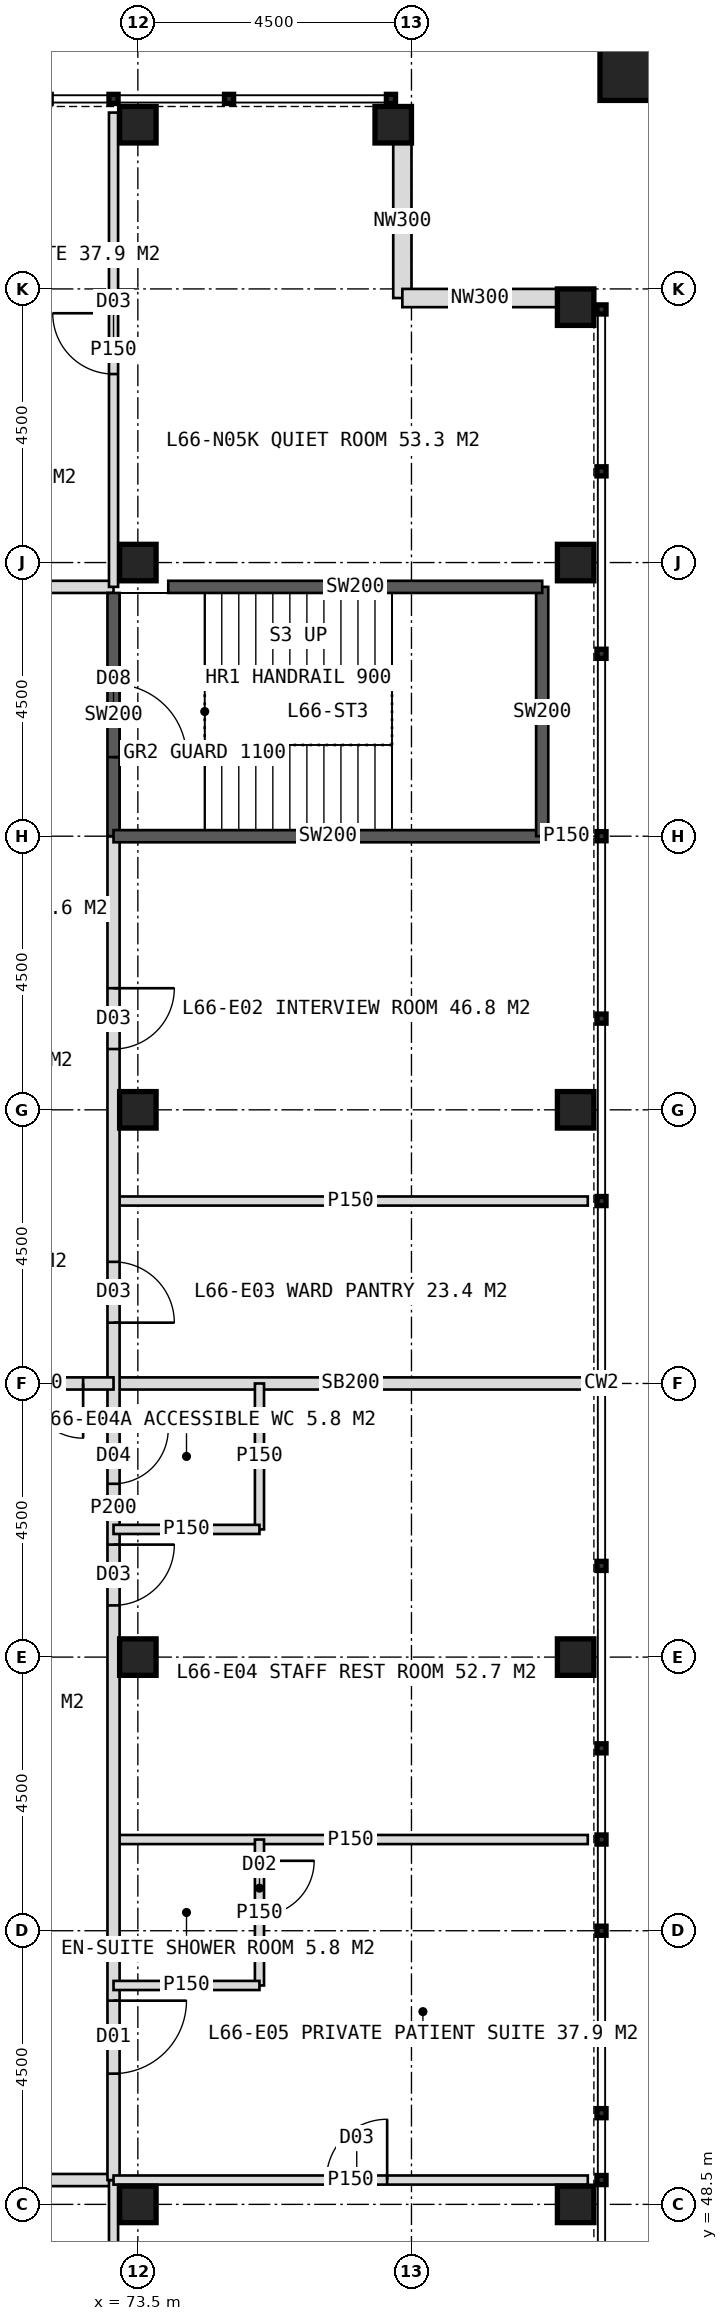
"""IFC4 building model, lengths in metres.
Left out: names, types, materials, properties, quantities, classifications, styles, units other than length and angle.
Written with IfcOpenShell. Run it as: python <this file> out.ifc"""

import sys

from ifc_helpers import new_model, si_unit, direction, frame, frame_2d, origin, origin_2d, place, context, subcontext, project, spatial, rectangle, hollow_rectangle, extrude, element, fill, save


model = new_model("IFC4")
c1 = context("Model", 3, precision=1e-05, world=origin(), true_north=direction((0.0, 1.0)))
c2 = subcontext(c1, "Body", "Model", "MODEL_VIEW")
j1 = project(units=[si_unit("LENGTHUNIT", "METRE"), si_unit("PLANEANGLEUNIT", "RADIAN")], contexts=[c1])
p1 = place(None, origin())
s1 = spatial("IfcSite", under=j1, at=p1, CompositionType="ELEMENT")
p2 = place(p1, origin())
s2 = spatial("IfcBuilding", under=s1, at=p2, CompositionType="ELEMENT")
p3 = place(p2, frame((0.0, 0.0, 274.0)))
s3 = spatial("IfcBuildingStorey", under=s2, at=p3, CompositionType="ELEMENT", Elevation=274.0)
for number, where, z_axis, x_axis in (
    (1, (73.5, 48.5, 0.0), (0.0, 0.0, 1.0), (1.0, 0.0, 0.0)),
    (2, (73.5, 75.5, 0.0), (0.0, 0.0, 1.0), (1.0, 0.0, 0.0)),
    (3, (73.5, 57.5, 0.0), (0.0, 0.0, 1.0), (1.0, 0.0, 0.0)),
    (4, (73.5, 66.5, 0.0), (0.0, 0.0, 1.0), (1.0, 0.0, 0.0)),
    (5, (80.7, 48.5, 0.0), (0.0, 0.0, 1.0), (1.0, 0.0, 0.0)),
    (6, (80.7, 57.5, 0.0), (0.0, 0.0, 1.0), (1.0, 0.0, 0.0)),
    (7, (80.7, 66.5, 0.0), (0.0, 0.0, 1.0), (1.0, 0.0, 0.0)),
    (8, (73.5, 82.7, 0.0), (0.0, 0.0, 1.0), (1.0, 0.0, 0.0)),
    (9, (80.7, 75.5, 0.0), (0.0, 0.0, 1.0), (1.0, 0.0, 0.0)),
    (10, (77.7, 82.7, 0.0), (0.0, 0.0, 1.0), (1.0, 0.0, 0.0)),
    (11, (80.7, 79.7, 0.0), (0.0, 0.0, 1.0), (1.0, 0.0, 0.0)),
):
    element("IfcColumn", number, at=place(p3, frame(where, z_axis=z_axis, x_axis=x_axis)), inside=s3, PredefinedType="COLUMN", context=c2, shape_type="SweptSolid", body=[
        extrude(hollow_rectangle(XDim=0.6, YDim=0.6, WallThickness=0.04, at=origin_2d()), origin(), (0.0, 0.0, 1.0), 4.0),
    ])
p4 = place(p3, frame((81.6, 83.6, 0.0), z_axis=(0.0, 0.0, 1.0), x_axis=(1.0, 0.0, 0.0)))
e12 = element("IfcColumn", 12, at=p4, inside=s3, PredefinedType="COLUMN", context=c2, shape_type="SweptSolid", body=[
    extrude(hollow_rectangle(XDim=1.0, YDim=1.0, WallThickness=0.06, at=origin_2d()), origin(), (0.0, 0.0, 1.0), 4.0),
])
for number, where, z_axis, x_axis in (
    (13, (77.85, 82.4, 0.0), (0.0, 0.0, 1.0), (0.0, -1.0, 0.0)),
    (14, (77.85, 79.85, 0.0), (0.0, 0.0, 1.0), (1.0, 0.0, 0.0)),
):
    element("IfcWall", number, at=place(p3, frame(where, z_axis=z_axis, x_axis=x_axis)), inside=s3, PredefinedType="ELEMENTEDWALL", context=c2, shape_type="SweptSolid", body=[
        extrude(rectangle(XDim=2.55, YDim=0.3, at=frame_2d((1.275, 0.0))), origin(), (0.0, 0.0, 1.0), 2.95),
    ])
p5 = place(p3, frame((46.9, 75.1, 0.0), z_axis=(0.0, 0.0, 1.0), x_axis=(1.0, 0.0, 0.0)))
e15 = element("IfcWall", 15, at=p5, inside=s3, PredefinedType="PARTITIONING", context=c2, shape_type="SweptSolid", body=[
    extrude(rectangle(XDim=26.2, YDim=0.2, at=frame_2d((13.1, 0.0))), origin(), (0.0, 0.0, 1.0), 3.75),
])
p6 = place(p5, frame((1.75, 0.0, 0.0)))
e16 = element("IfcOpeningElement", 16, at=p6, cuts=e15, PredefinedType="OPENING", context=c2, shape_type="SweptSolid", body=[
    extrude(rectangle(XDim=1.2, YDim=2.2, at=frame_2d((0.6, 1.1))), frame((0.0, 0.11, 0.0), z_axis=(0.0, -1.0, 0.0), x_axis=(1.0, 0.0, 0.0)), (0.0, 0.0, 1.0), 0.22),
])
p7 = place(p5, frame((6.75, 0.0, 0.0)))
e17 = element("IfcOpeningElement", 17, at=p7, cuts=e15, PredefinedType="OPENING", context=c2, shape_type="SweptSolid", body=[
    extrude(rectangle(XDim=1.0, YDim=2.1, at=frame_2d((0.5, 1.05))), frame((0.0, 0.11, 0.0), z_axis=(0.0, -1.0, 0.0), x_axis=(1.0, 0.0, 0.0)), (0.0, 0.0, 1.0), 0.22),
])
p8 = place(p5, frame((12.75, 0.0, 0.0)))
e18 = element("IfcOpeningElement", 18, at=p8, cuts=e15, PredefinedType="OPENING", context=c2, shape_type="SweptSolid", body=[
    extrude(rectangle(XDim=1.2, YDim=2.2, at=frame_2d((0.6, 1.1))), frame((0.0, 0.11, 0.0), z_axis=(0.0, -1.0, 0.0), x_axis=(1.0, 0.0, 0.0)), (0.0, 0.0, 1.0), 0.22),
])
p9 = place(p5, frame((18.45, 0.0, 0.0)))
e19 = element("IfcOpeningElement", 19, at=p9, cuts=e15, PredefinedType="OPENING", context=c2, shape_type="SweptSolid", body=[
    extrude(rectangle(XDim=1.0, YDim=2.1, at=frame_2d((0.5, 1.05))), frame((0.0, 0.11, 0.0), z_axis=(0.0, -1.0, 0.0), x_axis=(1.0, 0.0, 0.0)), (0.0, 0.0, 1.0), 0.22),
])
p10 = place(p5, frame((23.25, 0.0, 0.0)))
e20 = element("IfcOpeningElement", 20, at=p10, cuts=e15, PredefinedType="OPENING", context=c2, shape_type="SweptSolid", body=[
    extrude(rectangle(XDim=1.2, YDim=2.2, at=frame_2d((0.6, 1.1))), frame((0.0, 0.11, 0.0), z_axis=(0.0, -1.0, 0.0), x_axis=(1.0, 0.0, 0.0)), (0.0, 0.0, 1.0), 0.22),
])
p11 = place(p3, frame((73.1, 75.1, 0.0), z_axis=(0.0, 0.0, 1.0), x_axis=(0.0, 1.0, 0.0)))
e21 = element("IfcWall", 21, at=p11, inside=s3, PredefinedType="PARTITIONING", context=c2, shape_type="SweptSolid", body=[
    extrude(rectangle(XDim=7.8, YDim=0.15, at=frame_2d((3.9, 0.0))), origin(), (0.0, 0.0, 1.0), 3.75),
])
p12 = place(p11, frame((3.5, 0.0, 0.0)))
e22 = element("IfcOpeningElement", 22, at=p12, cuts=e21, PredefinedType="OPENING", context=c2, shape_type="SweptSolid", body=[
    extrude(rectangle(XDim=1.0, YDim=2.1, at=frame_2d((0.5, 1.05))), frame((0.0, 0.085, 0.0), z_axis=(0.0, -1.0, 0.0), x_axis=(1.0, 0.0, 0.0)), (0.0, 0.0, 1.0), 0.17),
])
p13 = place(p3, frame((73.1, 48.9, 0.0), z_axis=(0.0, 0.0, 1.0), x_axis=(-1.0, 0.0, 0.0)))
e23 = element("IfcWall", 23, at=p13, inside=s3, PredefinedType="PARTITIONING", context=c2, shape_type="SweptSolid", body=[
    extrude(rectangle(XDim=26.2, YDim=0.2, at=frame_2d((13.1, 0.0))), origin(), (0.0, 0.0, 1.0), 3.75),
])
p14 = place(p13, frame((1.55, 0.0, 0.0)))
e24 = element("IfcOpeningElement", 24, at=p14, cuts=e23, PredefinedType="OPENING", context=c2, shape_type="SweptSolid", body=[
    extrude(rectangle(XDim=1.0, YDim=2.1, at=frame_2d((0.5, 1.05))), frame((0.0, 0.11, 0.0), z_axis=(0.0, -1.0, 0.0), x_axis=(1.0, 0.0, 0.0)), (0.0, 0.0, 1.0), 0.22),
])
p15 = place(p13, frame((6.75, 0.0, 0.0)))
e25 = element("IfcOpeningElement", 25, at=p15, cuts=e23, PredefinedType="OPENING", context=c2, shape_type="SweptSolid", body=[
    extrude(rectangle(XDim=1.0, YDim=2.1, at=frame_2d((0.5, 1.05))), frame((0.0, 0.11, 0.0), z_axis=(0.0, -1.0, 0.0), x_axis=(1.0, 0.0, 0.0)), (0.0, 0.0, 1.0), 0.22),
])
p16 = place(p13, frame((14.25, 0.0, 0.0)))
e26 = element("IfcOpeningElement", 26, at=p16, cuts=e23, PredefinedType="OPENING", context=c2, shape_type="SweptSolid", body=[
    extrude(rectangle(XDim=1.2, YDim=2.2, at=frame_2d((0.6, 1.1))), frame((0.0, 0.11, 0.0), z_axis=(0.0, -1.0, 0.0), x_axis=(1.0, 0.0, 0.0)), (0.0, 0.0, 1.0), 0.22),
])
p17 = place(p13, frame((18.45, 0.0, 0.0)))
e27 = element("IfcOpeningElement", 27, at=p17, cuts=e23, PredefinedType="OPENING", context=c2, shape_type="SweptSolid", body=[
    extrude(rectangle(XDim=1.0, YDim=2.1, at=frame_2d((0.5, 1.05))), frame((0.0, 0.11, 0.0), z_axis=(0.0, -1.0, 0.0), x_axis=(1.0, 0.0, 0.0)), (0.0, 0.0, 1.0), 0.22),
])
p18 = place(p13, frame((23.25, 0.0, 0.0)))
e28 = element("IfcOpeningElement", 28, at=p18, cuts=e23, PredefinedType="OPENING", context=c2, shape_type="SweptSolid", body=[
    extrude(rectangle(XDim=1.2, YDim=2.2, at=frame_2d((0.6, 1.1))), frame((0.0, 0.11, 0.0), z_axis=(0.0, -1.0, 0.0), x_axis=(1.0, 0.0, 0.0)), (0.0, 0.0, 1.0), 0.22),
])
p19 = place(p3, frame((73.1, 48.9, 0.0), z_axis=(0.0, 0.0, 1.0), x_axis=(0.0, -1.0, 0.0)))
e29 = element("IfcWall", 29, at=p19, inside=s3, PredefinedType="PARTITIONING", context=c2, shape_type="SweptSolid", body=[
    extrude(rectangle(XDim=7.8, YDim=0.15, at=frame_2d((3.9, 0.0))), origin(), (0.0, 0.0, 1.0), 3.75),
])
p20 = place(p3, frame((80.2, 71.0, 0.0), z_axis=(0.0, 0.0, 1.0), x_axis=(1.0, 0.0, 0.0)))
e30 = element("IfcWall", 30, at=p20, inside=s3, PredefinedType="PARTITIONING", context=c2, shape_type="SweptSolid", body=[
    extrude(rectangle(XDim=0.7, YDim=0.15, at=frame_2d((0.35, 0.0))), origin(), (0.0, 0.0, 1.0), 3.75),
])
p21 = place(p3, frame((73.1, 65.0, 0.0), z_axis=(0.0, 0.0, 1.0), x_axis=(1.0, 0.0, 0.0)))
e31 = element("IfcWall", 31, at=p21, inside=s3, PredefinedType="PARTITIONING", context=c2, shape_type="SweptSolid", body=[
    extrude(rectangle(XDim=7.8, YDim=0.15, at=frame_2d((3.9, 0.0))), origin(), (0.0, 0.0, 1.0), 3.75),
])
p22 = place(p3, frame((73.1, 62.0, 0.0), z_axis=(0.0, 0.0, 1.0), x_axis=(1.0, 0.0, 0.0)))
e32 = element("IfcWall", 32, at=p22, inside=s3, PredefinedType="SOLIDWALL", context=c2, shape_type="SweptSolid", body=[
    extrude(rectangle(XDim=7.8, YDim=0.2, at=frame_2d((3.9, 0.0))), origin(), (0.0, 0.0, 1.0), 2.75),
])
p23 = place(p3, frame((73.1, 54.5, 0.0), z_axis=(0.0, 0.0, 1.0), x_axis=(1.0, 0.0, 0.0)))
e33 = element("IfcWall", 33, at=p23, inside=s3, PredefinedType="PARTITIONING", context=c2, shape_type="SweptSolid", body=[
    extrude(rectangle(XDim=7.8, YDim=0.15, at=frame_2d((3.9, 0.0))), origin(), (0.0, 0.0, 1.0), 3.75),
])
p24 = place(p3, frame((73.1, 71.0, 0.0), z_axis=(0.0, 0.0, 1.0), x_axis=(0.0, -1.0, 0.0)))
e34 = element("IfcWall", 34, at=p24, inside=s3, PredefinedType="PARTITIONING", context=c2, shape_type="SweptSolid", body=[
    extrude(rectangle(XDim=22.1, YDim=0.2, at=frame_2d((11.05, 0.0))), origin(), (0.0, 0.0, 1.0), 3.75),
])
p25 = place(p24, frame((2.5, 0.0, 0.0)))
e35 = element("IfcOpeningElement", 35, at=p25, cuts=e34, PredefinedType="OPENING", context=c2, shape_type="SweptSolid", body=[
    extrude(rectangle(XDim=1.0, YDim=2.1, at=frame_2d((0.5, 1.05))), frame((0.0, 0.11, 0.0), z_axis=(0.0, -1.0, 0.0), x_axis=(1.0, 0.0, 0.0)), (0.0, 0.0, 1.0), 0.22),
])
p26 = place(p24, frame((7.0, 0.0, 0.0)))
e36 = element("IfcOpeningElement", 36, at=p26, cuts=e34, PredefinedType="OPENING", context=c2, shape_type="SweptSolid", body=[
    extrude(rectangle(XDim=1.0, YDim=2.1, at=frame_2d((0.5, 1.05))), frame((0.0, 0.11, 0.0), z_axis=(0.0, -1.0, 0.0), x_axis=(1.0, 0.0, 0.0)), (0.0, 0.0, 1.0), 0.22),
])
p27 = place(p24, frame((9.75, 0.0, 0.0)))
e37 = element("IfcOpeningElement", 37, at=p27, cuts=e34, PredefinedType="OPENING", context=c2, shape_type="SweptSolid", body=[
    extrude(rectangle(XDim=0.9, YDim=2.1, at=frame_2d((0.45, 1.05))), frame((0.0, 0.11, 0.0), z_axis=(0.0, -1.0, 0.0), x_axis=(1.0, 0.0, 0.0)), (0.0, 0.0, 1.0), 0.22),
])
p28 = place(p24, frame((11.65, 0.0, 0.0)))
e38 = element("IfcOpeningElement", 38, at=p28, cuts=e34, PredefinedType="OPENING", context=c2, shape_type="SweptSolid", body=[
    extrude(rectangle(XDim=1.0, YDim=2.1, at=frame_2d((0.5, 1.05))), frame((0.0, 0.11, 0.0), z_axis=(0.0, -1.0, 0.0), x_axis=(1.0, 0.0, 0.0)), (0.0, 0.0, 1.0), 0.22),
])
p29 = place(p24, frame((19.15, 0.0, 0.0)))
e39 = element("IfcOpeningElement", 39, at=p29, cuts=e34, PredefinedType="OPENING", context=c2, shape_type="SweptSolid", body=[
    extrude(rectangle(XDim=1.2, YDim=2.2, at=frame_2d((0.6, 1.1))), frame((0.0, 0.11, 0.0), z_axis=(0.0, -1.0, 0.0), x_axis=(1.0, 0.0, 0.0)), (0.0, 0.0, 1.0), 0.22),
])
for number, where, z_axis, x_axis in (
    (40, (75.5, 62.0, 0.0), (0.0, 0.0, 1.0), (0.0, -1.0, 0.0)),
    (41, (73.1, 59.6, 0.0), (0.0, 0.0, 1.0), (1.0, 0.0, 0.0)),
):
    element("IfcWall", number, at=place(p3, frame(where, z_axis=z_axis, x_axis=x_axis)), inside=s3, PredefinedType="PARTITIONING", context=c2, shape_type="SweptSolid", body=[
        extrude(rectangle(XDim=2.4, YDim=0.15, at=frame_2d((1.2, 0.0))), origin(), (0.0, 0.0, 1.0), 3.75),
    ])
p30 = place(p3, frame((73.1, 48.9, 0.0), z_axis=(0.0, 0.0, 1.0), x_axis=(1.0, 0.0, 0.0)))
e42 = element("IfcWall", 42, at=p30, inside=s3, PredefinedType="PARTITIONING", context=c2, shape_type="SweptSolid", body=[
    extrude(rectangle(XDim=7.8, YDim=0.15, at=frame_2d((3.9, 0.0))), origin(), (0.0, 0.0, 1.0), 3.75),
])
p31 = place(p30, frame((3.5, 0.0, 0.0)))
e43 = element("IfcOpeningElement", 43, at=p31, cuts=e42, PredefinedType="OPENING", context=c2, shape_type="SweptSolid", body=[
    extrude(rectangle(XDim=1.0, YDim=2.1, at=frame_2d((0.5, 1.05))), frame((0.0, 0.085, 0.0), z_axis=(0.0, -1.0, 0.0), x_axis=(1.0, 0.0, 0.0)), (0.0, 0.0, 1.0), 0.17),
])
p32 = place(p3, frame((75.5, 54.5, 0.0), z_axis=(0.0, 0.0, 1.0), x_axis=(0.0, -1.0, 0.0)))
e44 = element("IfcWall", 44, at=p32, inside=s3, PredefinedType="PARTITIONING", context=c2, shape_type="SweptSolid", body=[
    extrude(rectangle(XDim=2.4, YDim=0.15, at=frame_2d((1.2, 0.0))), origin(), (0.0, 0.0, 1.0), 3.75),
])
p33 = place(p32, frame((0.35, 0.0, 0.0)))
e45 = element("IfcOpeningElement", 45, at=p33, cuts=e44, PredefinedType="OPENING", context=c2, shape_type="SweptSolid", body=[
    extrude(rectangle(XDim=0.9, YDim=2.1, at=frame_2d((0.45, 1.05))), frame((0.0, 0.085, 0.0), z_axis=(0.0, -1.0, 0.0), x_axis=(1.0, 0.0, 0.0)), (0.0, 0.0, 1.0), 0.17),
])
p34 = place(p3, frame((73.1, 52.1, 0.0), z_axis=(0.0, 0.0, 1.0), x_axis=(1.0, 0.0, 0.0)))
e46 = element("IfcWall", 46, at=p34, inside=s3, PredefinedType="PARTITIONING", context=c2, shape_type="SweptSolid", body=[
    extrude(rectangle(XDim=2.4, YDim=0.15, at=frame_2d((1.2, 0.0))), origin(), (0.0, 0.0, 1.0), 3.75),
])
p35 = place(p3, frame((70.5, 62.0, 0.0), z_axis=(0.0, 0.0, 1.0), x_axis=(1.0, 0.0, 0.0)))
e47 = element("IfcWall", 47, at=p35, inside=s3, PredefinedType="SOLIDWALL", context=c2, shape_type="SweptSolid", body=[
    extrude(rectangle(XDim=2.6, YDim=0.2, at=frame_2d((1.3, 0.0))), origin(), (0.0, 0.0, 1.0), 2.75),
])
p36 = place(p35, frame((0.3, 0.0, 0.0)))
e48 = element("IfcOpeningElement", 48, at=p36, cuts=e47, PredefinedType="OPENING", context=c2, shape_type="SweptSolid", body=[
    extrude(rectangle(XDim=1.8, YDim=2.2, at=frame_2d((0.9, 1.1))), frame((0.0, 0.11, 0.0), z_axis=(0.0, -1.0, 0.0), x_axis=(1.0, 0.0, 0.0)), (0.0, 0.0, 1.0), 0.22),
])
p37 = place(p3, frame((73.1, 75.0, 0.0), z_axis=(0.0, 0.0, 1.0), x_axis=(0.0, -1.0, 0.0)))
e49 = element("IfcWall", 49, at=p37, inside=s3, PredefinedType="SOLIDWALL", context=c2, shape_type="SweptSolid", body=[
    extrude(rectangle(XDim=4.0, YDim=0.2, at=frame_2d((2.0, 0.0))), origin(), (0.0, 0.0, 1.0), 3.75),
])
p38 = place(p37, frame((1.5, 0.0, 0.0)))
e50 = element("IfcOpeningElement", 50, at=p38, cuts=e49, PredefinedType="OPENING", context=c2, shape_type="SweptSolid", body=[
    extrude(rectangle(XDim=1.2, YDim=2.1, at=frame_2d((0.6, 1.05))), frame((0.0, 0.11, 0.0), z_axis=(0.0, -1.0, 0.0), x_axis=(1.0, 0.0, 0.0)), (0.0, 0.0, 1.0), 0.22),
])
p39 = place(p3, frame((73.1, 71.0, 0.0), z_axis=(0.0, 0.0, 1.0), x_axis=(1.0, 0.0, 0.0)))
e51 = element("IfcWall", 51, at=p39, inside=s3, PredefinedType="SOLIDWALL", context=c2, shape_type="SweptSolid", body=[
    extrude(rectangle(XDim=7.05, YDim=0.2, at=frame_2d((3.525, 0.0))), origin(), (0.0, 0.0, 1.0), 3.75),
])
p40 = place(p3, frame((80.15, 71.0, 0.0), z_axis=(0.0, 0.0, 1.0), x_axis=(0.0, 1.0, 0.0)))
e52 = element("IfcWall", 52, at=p40, inside=s3, PredefinedType="SOLIDWALL", context=c2, shape_type="SweptSolid", body=[
    extrude(rectangle(XDim=4.1, YDim=0.2, at=frame_2d((2.05, 0.0))), origin(), (0.0, 0.0, 1.0), 3.75),
])
p41 = place(p3, frame((74.0, 75.1, 0.0), z_axis=(0.0, 0.0, 1.0), x_axis=(1.0, 0.0, 0.0)))
e53 = element("IfcWall", 53, at=p41, inside=s3, PredefinedType="SOLIDWALL", context=c2, shape_type="SweptSolid", body=[
    extrude(rectangle(XDim=6.15, YDim=0.2, at=frame_2d((3.075, 0.0))), origin(), (0.0, 0.0, 1.0), 3.75),
])
p42 = place(p12, origin())
e54 = element("IfcDoor", 54, at=p42, inside=s3, OperationType="SINGLE_SWING_RIGHT", PredefinedType="DOOR", context=c2, shape_type="SweptSolid", body=[
    extrude(rectangle(XDim=1.0, YDim=2.1, at=frame_2d((0.5, 1.05))), frame((0.0, 0.025, 0.0), z_axis=(0.0, -1.0, 0.0), x_axis=(1.0, 0.0, 0.0)), (0.0, 0.0, 1.0), 0.05),
])
fill(e22, e54)
p43 = place(p25, origin())
e55 = element("IfcDoor", 55, at=p43, inside=s3, OperationType="SINGLE_SWING_LEFT", PredefinedType="DOOR", context=c2, shape_type="SweptSolid", body=[
    extrude(rectangle(XDim=1.0, YDim=2.1, at=frame_2d((0.5, 1.05))), frame((0.0, 0.025, 0.0), z_axis=(0.0, -1.0, 0.0), x_axis=(1.0, 0.0, 0.0)), (0.0, 0.0, 1.0), 0.05),
])
fill(e35, e55)
p44 = place(p26, origin())
e56 = element("IfcDoor", 56, at=p44, inside=s3, OperationType="SINGLE_SWING_RIGHT", PredefinedType="DOOR", context=c2, shape_type="SweptSolid", body=[
    extrude(rectangle(XDim=1.0, YDim=2.1, at=frame_2d((0.5, 1.05))), frame((0.0, 0.025, 0.0), z_axis=(0.0, -1.0, 0.0), x_axis=(1.0, 0.0, 0.0)), (0.0, 0.0, 1.0), 0.05),
])
fill(e36, e56)
p45 = place(p27, origin())
e57 = element("IfcDoor", 57, at=p45, inside=s3, OperationType="SINGLE_SWING_LEFT", PredefinedType="DOOR", context=c2, shape_type="SweptSolid", body=[
    extrude(rectangle(XDim=0.9, YDim=2.1, at=frame_2d((0.45, 1.05))), frame((0.0, 0.025, 0.0), z_axis=(0.0, -1.0, 0.0), x_axis=(1.0, 0.0, 0.0)), (0.0, 0.0, 1.0), 0.05),
])
fill(e37, e57)
p46 = place(p28, origin())
e58 = element("IfcDoor", 58, at=p46, inside=s3, OperationType="SINGLE_SWING_LEFT", PredefinedType="DOOR", context=c2, shape_type="SweptSolid", body=[
    extrude(rectangle(XDim=1.0, YDim=2.1, at=frame_2d((0.5, 1.05))), frame((0.0, 0.025, 0.0), z_axis=(0.0, -1.0, 0.0), x_axis=(1.0, 0.0, 0.0)), (0.0, 0.0, 1.0), 0.05),
])
fill(e38, e58)
p47 = place(p31, origin())
e59 = element("IfcDoor", 59, at=p47, inside=s3, OperationType="SINGLE_SWING_RIGHT", PredefinedType="DOOR", context=c2, shape_type="SweptSolid", body=[
    extrude(rectangle(XDim=1.0, YDim=2.1, at=frame_2d((0.5, 1.05))), frame((0.0, 0.025, 0.0), z_axis=(0.0, -1.0, 0.0), x_axis=(1.0, 0.0, 0.0)), (0.0, 0.0, 1.0), 0.05),
])
fill(e43, e59)
p48 = place(p29, origin())
e60 = element("IfcDoor", 60, at=p48, inside=s3, OperationType="SINGLE_SWING_LEFT", PredefinedType="DOOR", context=c2, shape_type="SweptSolid", body=[
    extrude(rectangle(XDim=1.2, YDim=2.2, at=frame_2d((0.6, 1.1))), frame((0.0, 0.025, 0.0), z_axis=(0.0, -1.0, 0.0), x_axis=(1.0, 0.0, 0.0)), (0.0, 0.0, 1.0), 0.05),
])
fill(e39, e60)
p49 = place(p33, origin())
e61 = element("IfcDoor", 61, at=p49, inside=s3, OperationType="SINGLE_SWING_LEFT", PredefinedType="DOOR", context=c2, shape_type="SweptSolid", body=[
    extrude(rectangle(XDim=0.9, YDim=2.1, at=frame_2d((0.45, 1.05))), frame((0.0, 0.025, 0.0), z_axis=(0.0, -1.0, 0.0), x_axis=(1.0, 0.0, 0.0)), (0.0, 0.0, 1.0), 0.05),
])
fill(e45, e61)
p50 = place(p36, origin())
e62 = element("IfcDoor", 62, at=p50, inside=s3, OperationType="DOUBLE_DOOR_DOUBLE_SWING", PredefinedType="DOOR", context=c2, shape_type="SweptSolid", body=[
    extrude(rectangle(XDim=1.8, YDim=2.2, at=frame_2d((0.9, 1.1))), frame((0.0, 0.025, 0.0), z_axis=(0.0, -1.0, 0.0), x_axis=(1.0, 0.0, 0.0)), (0.0, 0.0, 1.0), 0.05),
])
fill(e48, e62)
p51 = place(p38, origin())
e63 = element("IfcDoor", 63, at=p51, inside=s3, OperationType="SINGLE_SWING_RIGHT", PredefinedType="DOOR", context=c2, shape_type="SweptSolid", body=[
    extrude(rectangle(XDim=1.2, YDim=2.1, at=frame_2d((0.6, 1.05))), frame((0.0, 0.025, 0.0), z_axis=(0.0, -1.0, 0.0), x_axis=(1.0, 0.0, 0.0)), (0.0, 0.0, 1.0), 0.05),
])
fill(e50, e63)
save(model, sys.argv[1])
